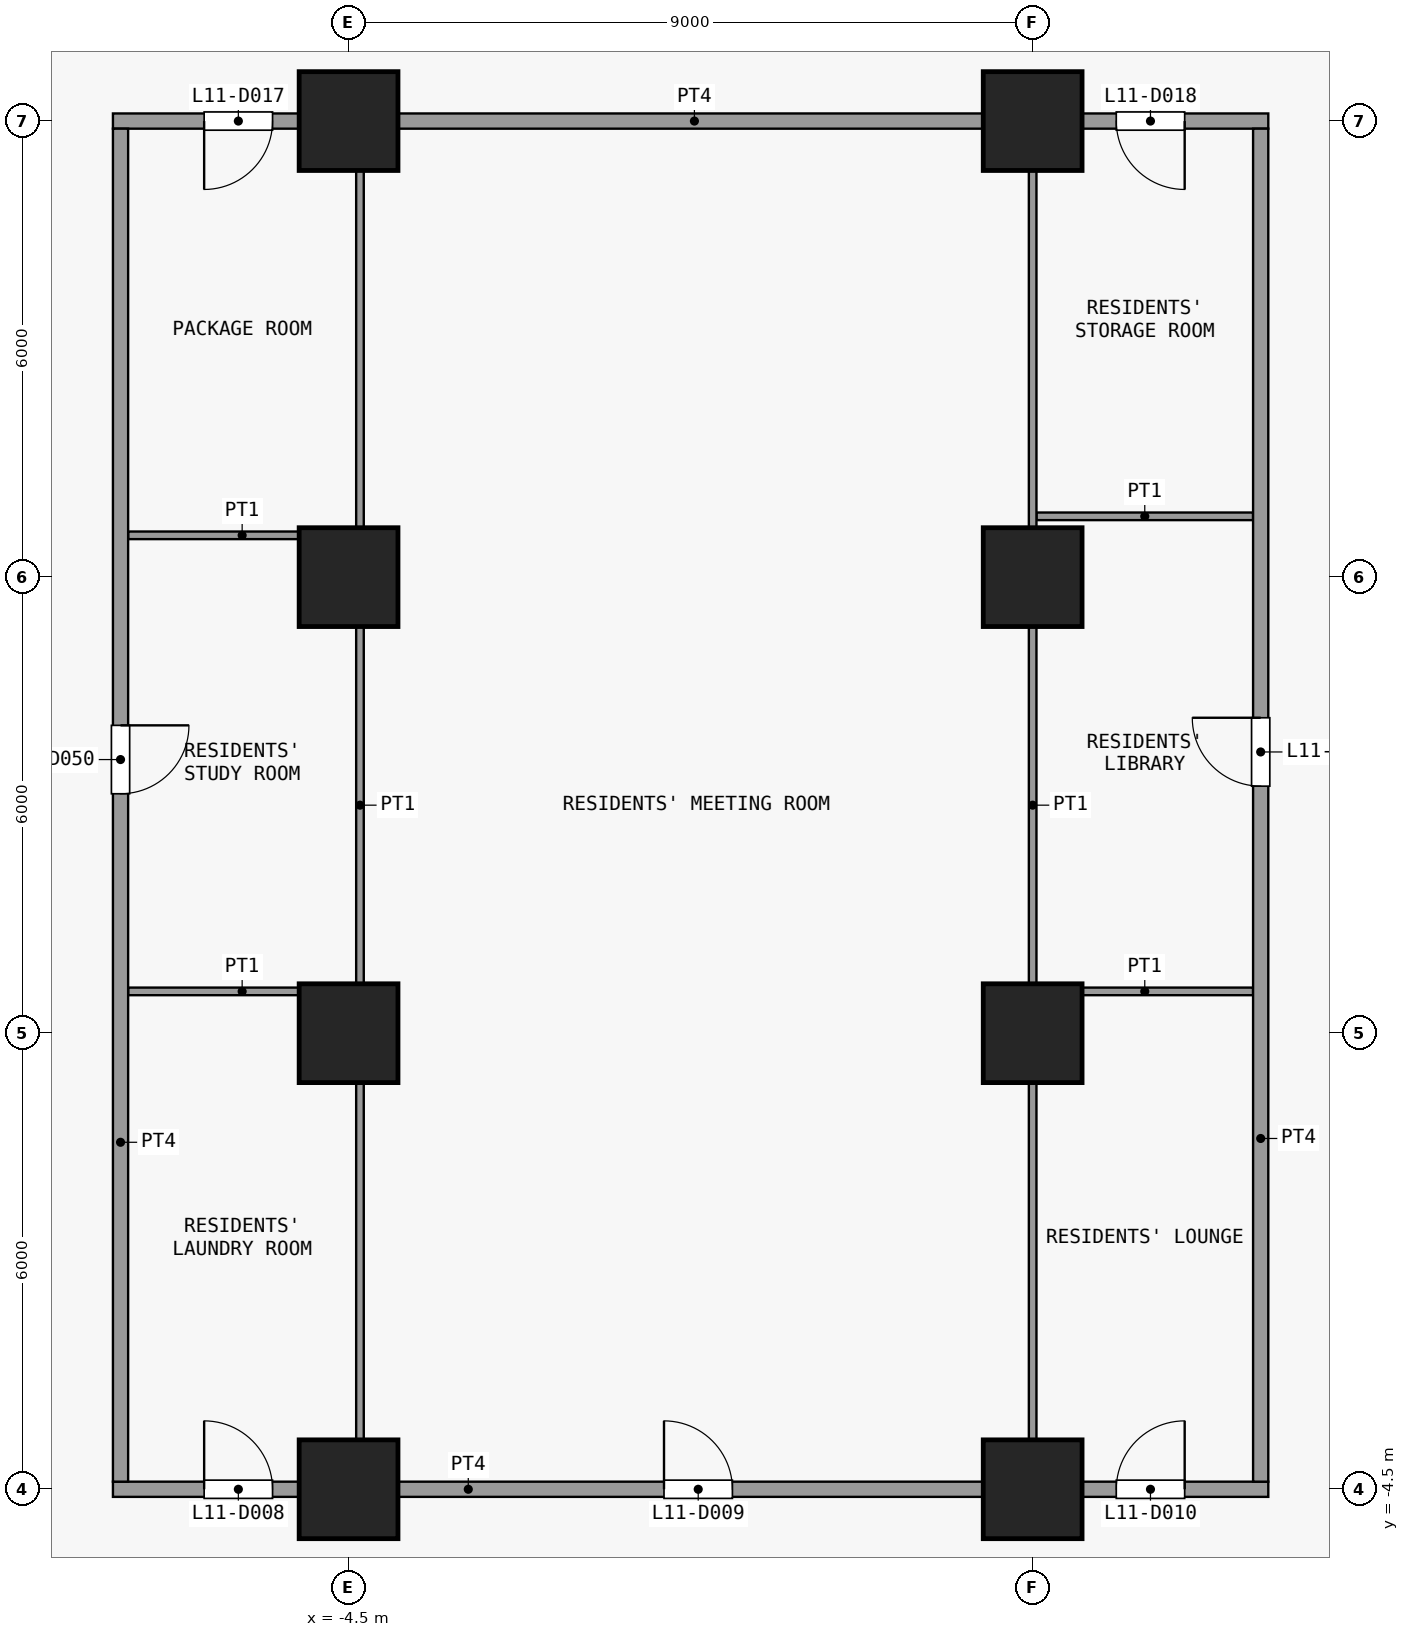
"""IFC4 building model, lengths in metres.
Left out: names, types, materials, properties, quantities, classifications, styles, units other than length and angle.
Written with IfcOpenShell. Run it as: python <this file> out.ifc"""

import sys

from ifc_helpers import new_model, si_unit, direction, frame, frame_2d, origin, origin_2d, place, context, subcontext, project, spatial, rectangle, extrude, element, fill, save


model = new_model("IFC4")
c1 = context("Model", 3, precision=1e-05, world=origin(), true_north=direction((0.0, 1.0)))
c2 = subcontext(c1, "Body", "Model", "MODEL_VIEW")
j1 = project(units=[si_unit("LENGTHUNIT", "METRE"), si_unit("PLANEANGLEUNIT", "RADIAN")], contexts=[c1])
p1 = place(None, origin())
s1 = spatial("IfcSite", under=j1, at=p1, CompositionType="ELEMENT")
p2 = place(p1, origin())
s2 = spatial("IfcBuilding", under=s1, at=p2, CompositionType="ELEMENT")
p3 = place(p2, frame((0.0, 0.0, 50.5)))
s3 = spatial("IfcBuildingStorey", under=s2, at=p3, CompositionType="ELEMENT", Elevation=50.5)
for number, where, z_axis, x_axis in (
    (1, (-4.5, -4.5, 0.0), (0.0, 0.0, 1.0), (1.0, 0.0, 0.0)),
    (2, (-4.5, 1.5, 0.0), (0.0, 0.0, 1.0), (1.0, 0.0, 0.0)),
    (3, (-4.5, 7.5, 0.0), (0.0, 0.0, 1.0), (1.0, 0.0, 0.0)),
    (4, (-4.5, 13.5, 0.0), (0.0, 0.0, 1.0), (1.0, 0.0, 0.0)),
    (5, (4.5, -4.5, 0.0), (0.0, 0.0, 1.0), (1.0, 0.0, 0.0)),
    (6, (4.5, 1.5, 0.0), (0.0, 0.0, 1.0), (1.0, 0.0, 0.0)),
    (7, (4.5, 7.5, 0.0), (0.0, 0.0, 1.0), (1.0, 0.0, 0.0)),
    (8, (4.5, 13.5, 0.0), (0.0, 0.0, 1.0), (1.0, 0.0, 0.0)),
):
    element("IfcColumn", number, at=place(p3, frame(where, z_axis=z_axis, x_axis=x_axis)), inside=s3, PredefinedType="COLUMN", context=c2, shape_type="SweptSolid", body=[
        extrude(rectangle(XDim=1.3, YDim=1.3, at=origin_2d()), origin(), (0.0, 0.0, 1.0), 3.6),
    ])
p4 = place(p3, frame((-7.6, -4.5, 0.0), z_axis=(0.0, 0.0, 1.0), x_axis=(1.0, 0.0, 0.0)))
e9 = element("IfcWall", 9, at=p4, inside=s3, PredefinedType="PARTITIONING", context=c2, shape_type="SweptSolid", body=[
    extrude(rectangle(XDim=15.2, YDim=0.2, at=frame_2d((7.6, 0.0))), origin(), (0.0, 0.0, 1.0), 3.3),
])
p5 = place(p4, frame((1.2, 0.0, 0.0)))
e10 = element("IfcOpeningElement", 10, at=p5, cuts=e9, PredefinedType="OPENING", context=c2, shape_type="SweptSolid", body=[
    extrude(rectangle(XDim=0.9, YDim=2.1, at=frame_2d((0.45, 1.05))), frame((0.0, 0.11, 0.0), z_axis=(0.0, -1.0, 0.0), x_axis=(1.0, 0.0, 0.0)), (0.0, 0.0, 1.0), 0.22),
])
p6 = place(p4, frame((7.25, 0.0, 0.0)))
e11 = element("IfcOpeningElement", 11, at=p6, cuts=e9, PredefinedType="OPENING", context=c2, shape_type="SweptSolid", body=[
    extrude(rectangle(XDim=0.9, YDim=2.1, at=frame_2d((0.45, 1.05))), frame((0.0, 0.11, 0.0), z_axis=(0.0, -1.0, 0.0), x_axis=(1.0, 0.0, 0.0)), (0.0, 0.0, 1.0), 0.22),
])
p7 = place(p4, frame((13.2, 0.0, 0.0)))
e12 = element("IfcOpeningElement", 12, at=p7, cuts=e9, PredefinedType="OPENING", context=c2, shape_type="SweptSolid", body=[
    extrude(rectangle(XDim=0.9, YDim=2.1, at=frame_2d((0.45, 1.05))), frame((0.0, 0.11, 0.0), z_axis=(0.0, -1.0, 0.0), x_axis=(1.0, 0.0, 0.0)), (0.0, 0.0, 1.0), 0.22),
])
p8 = place(p3, frame((-7.4, 2.05, 0.0), z_axis=(0.0, 0.0, 1.0), x_axis=(1.0, 0.0, 0.0)))
e13 = element("IfcWall", 13, at=p8, inside=s3, PredefinedType="PARTITIONING", context=c2, shape_type="SweptSolid", body=[
    extrude(rectangle(XDim=3.0, YDim=0.1, at=frame_2d((1.5, 0.0))), origin(), (0.0, 0.0, 1.0), 3.3),
])
p9 = place(p3, frame((4.55, 2.05, 0.0), z_axis=(0.0, 0.0, 1.0), x_axis=(1.0, 0.0, 0.0)))
e14 = element("IfcWall", 14, at=p9, inside=s3, PredefinedType="PARTITIONING", context=c2, shape_type="SweptSolid", body=[
    extrude(rectangle(XDim=2.85, YDim=0.1, at=frame_2d((1.425, 0.0))), origin(), (0.0, 0.0, 1.0), 3.3),
])
p10 = place(p3, frame((-7.4, 8.05, 0.0), z_axis=(0.0, 0.0, 1.0), x_axis=(1.0, 0.0, 0.0)))
e15 = element("IfcWall", 15, at=p10, inside=s3, PredefinedType="PARTITIONING", context=c2, shape_type="SweptSolid", body=[
    extrude(rectangle(XDim=3.0, YDim=0.1, at=frame_2d((1.5, 0.0))), origin(), (0.0, 0.0, 1.0), 3.3),
])
p11 = place(p3, frame((4.55, 8.3, 0.0), z_axis=(0.0, 0.0, 1.0), x_axis=(1.0, 0.0, 0.0)))
e16 = element("IfcWall", 16, at=p11, inside=s3, PredefinedType="PARTITIONING", context=c2, shape_type="SweptSolid", body=[
    extrude(rectangle(XDim=2.85, YDim=0.1, at=frame_2d((1.425, 0.0))), origin(), (0.0, 0.0, 1.0), 3.3),
])
p12 = place(p3, frame((-7.6, 13.5, 0.0), z_axis=(0.0, 0.0, 1.0), x_axis=(1.0, 0.0, 0.0)))
e17 = element("IfcWall", 17, at=p12, inside=s3, PredefinedType="PARTITIONING", context=c2, shape_type="SweptSolid", body=[
    extrude(rectangle(XDim=15.2, YDim=0.2, at=frame_2d((7.6, 0.0))), origin(), (0.0, 0.0, 1.0), 3.3),
])
p13 = place(p12, frame((1.2, 0.0, 0.0)))
e18 = element("IfcOpeningElement", 18, at=p13, cuts=e17, PredefinedType="OPENING", context=c2, shape_type="SweptSolid", body=[
    extrude(rectangle(XDim=0.9, YDim=2.1, at=frame_2d((0.45, 1.05))), frame((0.0, 0.11, 0.0), z_axis=(0.0, -1.0, 0.0), x_axis=(1.0, 0.0, 0.0)), (0.0, 0.0, 1.0), 0.22),
])
p14 = place(p12, frame((13.2, 0.0, 0.0)))
e19 = element("IfcOpeningElement", 19, at=p14, cuts=e17, PredefinedType="OPENING", context=c2, shape_type="SweptSolid", body=[
    extrude(rectangle(XDim=0.9, YDim=2.1, at=frame_2d((0.45, 1.05))), frame((0.0, 0.11, 0.0), z_axis=(0.0, -1.0, 0.0), x_axis=(1.0, 0.0, 0.0)), (0.0, 0.0, 1.0), 0.22),
])
p15 = place(p3, frame((-7.5, -4.4, 0.0), z_axis=(0.0, 0.0, 1.0), x_axis=(0.0, 1.0, 0.0)))
e20 = element("IfcWall", 20, at=p15, inside=s3, PredefinedType="PARTITIONING", context=c2, shape_type="SweptSolid", body=[
    extrude(rectangle(XDim=17.8, YDim=0.2, at=frame_2d((8.9, 0.0))), origin(), (0.0, 0.0, 1.0), 3.3),
])
p16 = place(p15, frame((9.05, 0.0, 0.0)))
e21 = element("IfcOpeningElement", 21, at=p16, cuts=e20, PredefinedType="OPENING", context=c2, shape_type="SweptSolid", body=[
    extrude(rectangle(XDim=0.9, YDim=2.1, at=frame_2d((0.45, 1.05))), frame((0.0, 0.11, 0.0), z_axis=(0.0, -1.0, 0.0), x_axis=(1.0, 0.0, 0.0)), (0.0, 0.0, 1.0), 0.22),
])
for number, where, z_axis, x_axis in (
    (22, (-4.35, -4.4, 0.0), (0.0, 0.0, 1.0), (0.0, 1.0, 0.0)),
    (23, (4.5, -4.4, 0.0), (0.0, 0.0, 1.0), (0.0, 1.0, 0.0)),
):
    element("IfcWall", number, at=place(p3, frame(where, z_axis=z_axis, x_axis=x_axis)), inside=s3, PredefinedType="PARTITIONING", context=c2, shape_type="SweptSolid", body=[
        extrude(rectangle(XDim=17.8, YDim=0.1, at=frame_2d((8.9, 0.0))), origin(), (0.0, 0.0, 1.0), 3.3),
    ])
p17 = place(p3, frame((7.5, -4.4, 0.0), z_axis=(0.0, 0.0, 1.0), x_axis=(0.0, 1.0, 0.0)))
e24 = element("IfcWall", 24, at=p17, inside=s3, PredefinedType="PARTITIONING", context=c2, shape_type="SweptSolid", body=[
    extrude(rectangle(XDim=17.8, YDim=0.2, at=frame_2d((8.9, 0.0))), origin(), (0.0, 0.0, 1.0), 3.3),
])
p18 = place(p17, frame((9.15, 0.0, 0.0)))
e25 = element("IfcOpeningElement", 25, at=p18, cuts=e24, PredefinedType="OPENING", context=c2, shape_type="SweptSolid", body=[
    extrude(rectangle(XDim=0.9, YDim=2.1, at=frame_2d((0.45, 1.05))), frame((0.0, 0.11, 0.0), z_axis=(0.0, -1.0, 0.0), x_axis=(1.0, 0.0, 0.0)), (0.0, 0.0, 1.0), 0.22),
])
p19 = place(p5, origin())
e26 = element("IfcDoor", 26, at=p19, inside=s3, OperationType="SINGLE_SWING_RIGHT", PredefinedType="DOOR", context=c2, shape_type="SweptSolid", body=[
    extrude(rectangle(XDim=0.9, YDim=2.1, at=frame_2d((0.45, 1.05))), frame((0.0, 0.025, 0.0), z_axis=(0.0, -1.0, 0.0), x_axis=(1.0, 0.0, 0.0)), (0.0, 0.0, 1.0), 0.05),
])
fill(e10, e26)
p20 = place(p6, origin())
e27 = element("IfcDoor", 27, at=p20, inside=s3, OperationType="SINGLE_SWING_RIGHT", PredefinedType="DOOR", context=c2, shape_type="SweptSolid", body=[
    extrude(rectangle(XDim=0.9, YDim=2.1, at=frame_2d((0.45, 1.05))), frame((0.0, 0.025, 0.0), z_axis=(0.0, -1.0, 0.0), x_axis=(1.0, 0.0, 0.0)), (0.0, 0.0, 1.0), 0.05),
])
fill(e11, e27)
p21 = place(p7, origin())
e28 = element("IfcDoor", 28, at=p21, inside=s3, OperationType="SINGLE_SWING_LEFT", PredefinedType="DOOR", context=c2, shape_type="SweptSolid", body=[
    extrude(rectangle(XDim=0.9, YDim=2.1, at=frame_2d((0.45, 1.05))), frame((0.0, 0.025, 0.0), z_axis=(0.0, -1.0, 0.0), x_axis=(1.0, 0.0, 0.0)), (0.0, 0.0, 1.0), 0.05),
])
fill(e12, e28)
p22 = place(p13, origin())
e29 = element("IfcDoor", 29, at=p22, inside=s3, OperationType="SINGLE_SWING_LEFT", PredefinedType="DOOR", context=c2, shape_type="SweptSolid", body=[
    extrude(rectangle(XDim=0.9, YDim=2.1, at=frame_2d((0.45, 1.05))), frame((0.0, 0.025, 0.0), z_axis=(0.0, -1.0, 0.0), x_axis=(1.0, 0.0, 0.0)), (0.0, 0.0, 1.0), 0.05),
])
fill(e18, e29)
p23 = place(p14, origin())
e30 = element("IfcDoor", 30, at=p23, inside=s3, OperationType="SINGLE_SWING_RIGHT", PredefinedType="DOOR", context=c2, shape_type="SweptSolid", body=[
    extrude(rectangle(XDim=0.9, YDim=2.1, at=frame_2d((0.45, 1.05))), frame((0.0, 0.025, 0.0), z_axis=(0.0, -1.0, 0.0), x_axis=(1.0, 0.0, 0.0)), (0.0, 0.0, 1.0), 0.05),
])
fill(e19, e30)
p24 = place(p16, origin())
e31 = element("IfcDoor", 31, at=p24, inside=s3, OperationType="SINGLE_SWING_RIGHT", PredefinedType="DOOR", context=c2, shape_type="SweptSolid", body=[
    extrude(rectangle(XDim=0.9, YDim=2.1, at=frame_2d((0.45, 1.05))), frame((0.0, 0.025, 0.0), z_axis=(0.0, -1.0, 0.0), x_axis=(1.0, 0.0, 0.0)), (0.0, 0.0, 1.0), 0.05),
])
fill(e21, e31)
p25 = place(p18, origin())
e32 = element("IfcDoor", 32, at=p25, inside=s3, OperationType="SINGLE_SWING_LEFT", PredefinedType="DOOR", context=c2, shape_type="SweptSolid", body=[
    extrude(rectangle(XDim=0.9, YDim=2.1, at=frame_2d((0.45, 1.05))), frame((0.0, 0.025, 0.0), z_axis=(0.0, -1.0, 0.0), x_axis=(1.0, 0.0, 0.0)), (0.0, 0.0, 1.0), 0.05),
])
fill(e25, e32)
save(model, sys.argv[1])
